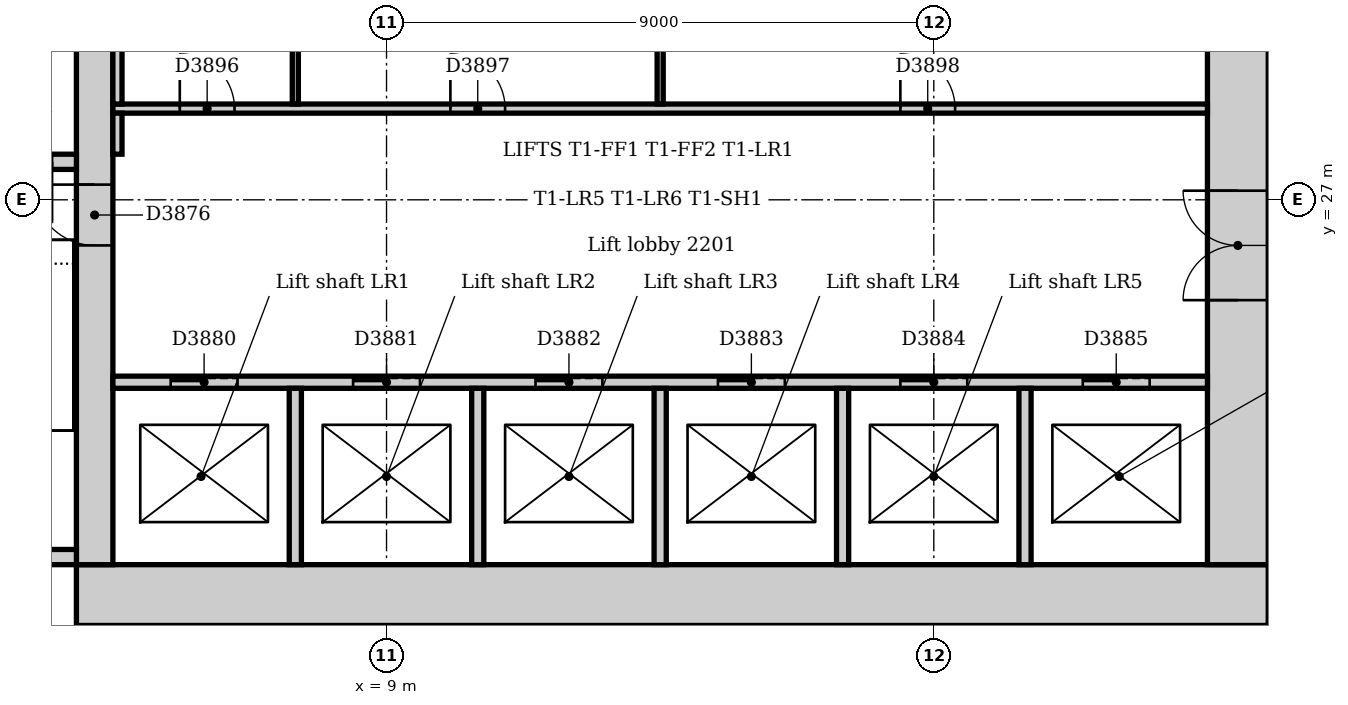
"""IFC4 building model, lengths in metres.
Left out: names, types, materials, properties, quantities, classifications, styles, units other than length and angle.
Written with IfcOpenShell. Run it as: python <this file> out.ifc"""

import sys

from ifc_helpers import new_model, si_unit, direction, frame, frame_2d, origin, place, context, subcontext, project, spatial, rectangle, extrude, element, fill, save


model = new_model("IFC4")
c1 = context("Model", 3, precision=1e-05, world=origin(), true_north=direction((0.0, 1.0)))
c2 = subcontext(c1, "Body", "Model", "MODEL_VIEW")
j1 = project(units=[si_unit("LENGTHUNIT", "METRE"), si_unit("PLANEANGLEUNIT", "RADIAN")], contexts=[c1])
p1 = place(None, origin())
s1 = spatial("IfcSite", under=j1, at=p1, CompositionType="ELEMENT")
p2 = place(p1, origin())
s2 = spatial("IfcBuilding", under=s1, at=p2, CompositionType="ELEMENT")
p3 = place(p2, frame((0.0, 0.0, 95.0)))
s3 = spatial("IfcBuildingStorey", under=s2, at=p3, CompositionType="ELEMENT", Elevation=95.0)
p4 = place(p3, frame((3.9, 20.5, 0.0), z_axis=(0.0, 0.0, 1.0), x_axis=(1.0, 0.0, 0.0)))
e1 = element("IfcWall", 1, at=p4, inside=s3, PredefinedType="SOLIDWALL", context=c2, shape_type="SweptSolid", body=[
    extrude(rectangle(XDim=19.6, YDim=1.0, at=frame_2d((9.8, 0.0))), origin(), (0.0, 0.0, 1.0), 5.0),
])
p5 = place(p3, frame((23.0, 21.0, 0.0), z_axis=(0.0, 0.0, 1.0), x_axis=(0.0, 1.0, 0.0)))
e2 = element("IfcWall", 2, at=p5, inside=s3, PredefinedType="SOLIDWALL", context=c2, shape_type="SweptSolid", body=[
    extrude(rectangle(XDim=10.5, YDim=1.0, at=frame_2d((5.25, 0.0))), origin(), (0.0, 0.0, 1.0), 5.0),
])
p6 = place(p5, frame((4.35, 0.0, 0.0)))
e3 = element("IfcOpeningElement", 3, at=p6, cuts=e2, PredefinedType="OPENING", context=c2, shape_type="SweptSolid", body=[
    extrude(rectangle(XDim=1.8, YDim=2.1, at=frame_2d((0.9, 1.05))), frame((0.0, 0.51, 0.0), z_axis=(0.0, -1.0, 0.0), x_axis=(1.0, 0.0, 0.0)), (0.0, 0.0, 1.0), 1.02),
])
p7 = place(p3, frame((4.2, 31.5, 0.0), z_axis=(0.0, 0.0, 1.0), x_axis=(0.0, -1.0, 0.0)))
e4 = element("IfcWall", 4, at=p7, inside=s3, PredefinedType="SOLIDWALL", context=c2, shape_type="SweptSolid", body=[
    extrude(rectangle(XDim=10.5, YDim=0.6, at=frame_2d((5.25, 0.0))), origin(), (0.0, 0.0, 1.0), 5.0),
])
p8 = place(p7, frame((4.25, 0.0, 0.0)))
e5 = element("IfcOpeningElement", 5, at=p8, cuts=e4, PredefinedType="OPENING", context=c2, shape_type="SweptSolid", body=[
    extrude(rectangle(XDim=1.0, YDim=2.1, at=frame_2d((0.5, 1.05))), frame((0.0, 0.31, 0.0), z_axis=(0.0, -1.0, 0.0), x_axis=(1.0, 0.0, 0.0)), (0.0, 0.0, 1.0), 0.62),
])
p9 = place(p3, frame((0.36, 21.125, 0.0), z_axis=(0.0, 0.0, 1.0), x_axis=(1.0, 0.0, 0.0)))
e6 = element("IfcWall", 6, at=p9, inside=s3, PredefinedType="SOLIDWALL", context=c2, shape_type="SweptSolid", body=[
    extrude(rectangle(XDim=3.54, YDim=0.25, at=frame_2d((1.77, 0.0))), origin(), (0.0, 0.0, 1.0), 5.0),
])
p10 = place(p3, frame((3.9, 27.625, 0.0), z_axis=(0.0, 0.0, 1.0), x_axis=(-1.0, 0.0, 0.0)))
e7 = element("IfcWall", 7, at=p10, inside=s3, PredefinedType="SOLIDWALL", context=c2, shape_type="SweptSolid", body=[
    extrude(rectangle(XDim=3.54, YDim=0.25, at=frame_2d((1.77, 0.0))), origin(), (0.0, 0.0, 1.0), 5.0),
])
p11 = place(p10, frame((0.4, 0.0, 0.0)))
e8 = element("IfcOpeningElement", 8, at=p11, cuts=e7, PredefinedType="OPENING", context=c2, shape_type="SweptSolid", body=[
    extrude(rectangle(XDim=1.0, YDim=2.1, at=frame_2d((0.5, 1.05))), frame((0.0, 0.135, 0.0), z_axis=(0.0, -1.0, 0.0), x_axis=(1.0, 0.0, 0.0)), (0.0, 0.0, 1.0), 0.27),
])
p12 = place(p3, frame((4.5, 24.0, 0.0), z_axis=(0.0, 0.0, 1.0), x_axis=(1.0, 0.0, 0.0)))
e9 = element("IfcWall", 9, at=p12, inside=s3, PredefinedType="PARTITIONING", context=c2, shape_type="SweptSolid", body=[
    extrude(rectangle(XDim=18.0, YDim=0.2, at=frame_2d((9.0, 0.0))), origin(), (0.0, 0.0, 1.0), 4.85),
])
p13 = place(p12, frame((0.95, 0.0, 0.0)))
e10 = element("IfcOpeningElement", 10, at=p13, cuts=e9, PredefinedType="OPENING", context=c2, shape_type="SweptSolid", body=[
    extrude(rectangle(XDim=1.1, YDim=2.1, at=frame_2d((0.55, 1.05))), frame((0.0, 0.11, 0.0), z_axis=(0.0, -1.0, 0.0), x_axis=(1.0, 0.0, 0.0)), (0.0, 0.0, 1.0), 0.22),
])
p14 = place(p12, frame((3.95, 0.0, 0.0)))
e11 = element("IfcOpeningElement", 11, at=p14, cuts=e9, PredefinedType="OPENING", context=c2, shape_type="SweptSolid", body=[
    extrude(rectangle(XDim=1.1, YDim=2.1, at=frame_2d((0.55, 1.05))), frame((0.0, 0.11, 0.0), z_axis=(0.0, -1.0, 0.0), x_axis=(1.0, 0.0, 0.0)), (0.0, 0.0, 1.0), 0.22),
])
p15 = place(p12, frame((6.95, 0.0, 0.0)))
e12 = element("IfcOpeningElement", 12, at=p15, cuts=e9, PredefinedType="OPENING", context=c2, shape_type="SweptSolid", body=[
    extrude(rectangle(XDim=1.1, YDim=2.1, at=frame_2d((0.55, 1.05))), frame((0.0, 0.11, 0.0), z_axis=(0.0, -1.0, 0.0), x_axis=(1.0, 0.0, 0.0)), (0.0, 0.0, 1.0), 0.22),
])
p16 = place(p12, frame((9.95, 0.0, 0.0)))
e13 = element("IfcOpeningElement", 13, at=p16, cuts=e9, PredefinedType="OPENING", context=c2, shape_type="SweptSolid", body=[
    extrude(rectangle(XDim=1.1, YDim=2.1, at=frame_2d((0.55, 1.05))), frame((0.0, 0.11, 0.0), z_axis=(0.0, -1.0, 0.0), x_axis=(1.0, 0.0, 0.0)), (0.0, 0.0, 1.0), 0.22),
])
p17 = place(p12, frame((12.95, 0.0, 0.0)))
e14 = element("IfcOpeningElement", 14, at=p17, cuts=e9, PredefinedType="OPENING", context=c2, shape_type="SweptSolid", body=[
    extrude(rectangle(XDim=1.1, YDim=2.1, at=frame_2d((0.55, 1.05))), frame((0.0, 0.11, 0.0), z_axis=(0.0, -1.0, 0.0), x_axis=(1.0, 0.0, 0.0)), (0.0, 0.0, 1.0), 0.22),
])
p18 = place(p12, frame((15.95, 0.0, 0.0)))
e15 = element("IfcOpeningElement", 15, at=p18, cuts=e9, PredefinedType="OPENING", context=c2, shape_type="SweptSolid", body=[
    extrude(rectangle(XDim=1.1, YDim=2.1, at=frame_2d((0.55, 1.05))), frame((0.0, 0.11, 0.0), z_axis=(0.0, -1.0, 0.0), x_axis=(1.0, 0.0, 0.0)), (0.0, 0.0, 1.0), 0.22),
])
for number, where, z_axis, x_axis in (
    (16, (7.5, 21.0, 0.0), (0.0, 0.0, 1.0), (0.0, 1.0, 0.0)),
    (17, (10.5, 21.0, 0.0), (0.0, 0.0, 1.0), (0.0, 1.0, 0.0)),
    (18, (13.5, 21.0, 0.0), (0.0, 0.0, 1.0), (0.0, 1.0, 0.0)),
    (19, (16.5, 21.0, 0.0), (0.0, 0.0, 1.0), (0.0, 1.0, 0.0)),
    (20, (19.5, 21.0, 0.0), (0.0, 0.0, 1.0), (0.0, 1.0, 0.0)),
):
    element("IfcWall", number, at=place(p3, frame(where, z_axis=z_axis, x_axis=x_axis)), inside=s3, PredefinedType="PARTITIONING", context=c2, shape_type="SweptSolid", body=[
        extrude(rectangle(XDim=2.9, YDim=0.2, at=frame_2d((1.45, 0.0))), origin(), (0.0, 0.0, 1.0), 4.85),
    ])
p19 = place(p3, frame((4.5, 28.5, 0.0), z_axis=(0.0, 0.0, 1.0), x_axis=(1.0, 0.0, 0.0)))
e21 = element("IfcWall", 21, at=p19, inside=s3, PredefinedType="PARTITIONING", context=c2, shape_type="SweptSolid", body=[
    extrude(rectangle(XDim=18.0, YDim=0.15, at=frame_2d((9.0, 0.0))), origin(), (0.0, 0.0, 1.0), 4.85),
])
p20 = place(p19, frame((1.1, 0.0, 0.0)))
e22 = element("IfcOpeningElement", 22, at=p20, cuts=e21, PredefinedType="OPENING", context=c2, shape_type="SweptSolid", body=[
    extrude(rectangle(XDim=0.9, YDim=2.1, at=frame_2d((0.45, 1.05))), frame((0.0, 0.085, 0.0), z_axis=(0.0, -1.0, 0.0), x_axis=(1.0, 0.0, 0.0)), (0.0, 0.0, 1.0), 0.17),
])
p21 = place(p19, frame((5.55, 0.0, 0.0)))
e23 = element("IfcOpeningElement", 23, at=p21, cuts=e21, PredefinedType="OPENING", context=c2, shape_type="SweptSolid", body=[
    extrude(rectangle(XDim=0.9, YDim=2.1, at=frame_2d((0.45, 1.05))), frame((0.0, 0.085, 0.0), z_axis=(0.0, -1.0, 0.0), x_axis=(1.0, 0.0, 0.0)), (0.0, 0.0, 1.0), 0.17),
])
p22 = place(p19, frame((12.95, 0.0, 0.0)))
e24 = element("IfcOpeningElement", 24, at=p22, cuts=e21, PredefinedType="OPENING", context=c2, shape_type="SweptSolid", body=[
    extrude(rectangle(XDim=0.9, YDim=2.1, at=frame_2d((0.45, 1.05))), frame((0.0, 0.085, 0.0), z_axis=(0.0, -1.0, 0.0), x_axis=(1.0, 0.0, 0.0)), (0.0, 0.0, 1.0), 0.17),
])
p23 = place(p3, frame((4.575, 27.75, 0.0), z_axis=(0.0, 0.0, 1.0), x_axis=(0.0, 1.0, 0.0)))
e25 = element("IfcWall", 25, at=p23, inside=s3, PredefinedType="PARTITIONING", context=c2, shape_type="SweptSolid", body=[
    extrude(rectangle(XDim=0.675, YDim=0.15, at=frame_2d((0.338, 0.0))), origin(), (0.0, 0.0, 1.0), 4.85),
])
p24 = place(p3, frame((4.575, 28.575, 0.0), z_axis=(0.0, 0.0, 1.0), x_axis=(0.0, 1.0, 0.0)))
e26 = element("IfcWall", 26, at=p24, inside=s3, PredefinedType="PARTITIONING", context=c2, shape_type="SweptSolid", body=[
    extrude(rectangle(XDim=2.675, YDim=0.15, at=frame_2d((1.337, 0.0))), origin(), (0.0, 0.0, 1.0), 4.85),
])
for number, where, z_axis, x_axis in (
    (27, (7.5, 28.575, 0.0), (0.0, 0.0, 1.0), (0.0, 1.0, 0.0)),
    (28, (13.5, 28.575, 0.0), (0.0, 0.0, 1.0), (0.0, 1.0, 0.0)),
):
    element("IfcWall", number, at=place(p3, frame(where, z_axis=z_axis, x_axis=x_axis)), inside=s3, PredefinedType="PARTITIONING", context=c2, shape_type="SweptSolid", body=[
        extrude(rectangle(XDim=2.675, YDim=0.1, at=frame_2d((1.337, 0.0))), origin(), (0.0, 0.0, 1.0), 4.85),
    ])
p25 = place(p8, frame((1.0, 0.0, 0.0), z_axis=(0.0, 0.0, 1.0), x_axis=(-1.0, 0.0, 0.0)))
e29 = element("IfcDoor", 29, at=p25, inside=s3, OperationType="SINGLE_SWING_RIGHT", PredefinedType="DOOR", context=c2, shape_type="SweptSolid", body=[
    extrude(rectangle(XDim=1.0, YDim=2.1, at=frame_2d((0.5, 1.05))), frame((0.0, 0.025, 0.0), z_axis=(0.0, -1.0, 0.0), x_axis=(1.0, 0.0, 0.0)), (0.0, 0.0, 1.0), 0.05),
])
fill(e5, e29)
p26 = place(p13, origin())
e30 = element("IfcDoor", 30, at=p26, inside=s3, OperationType="SLIDING_TO_LEFT", PredefinedType="DOOR", context=c2, shape_type="SweptSolid", body=[
    extrude(rectangle(XDim=1.1, YDim=2.1, at=frame_2d((0.55, 1.05))), frame((0.0, 0.025, 0.0), z_axis=(0.0, -1.0, 0.0), x_axis=(1.0, 0.0, 0.0)), (0.0, 0.0, 1.0), 0.05),
])
fill(e10, e30)
p27 = place(p14, origin())
e31 = element("IfcDoor", 31, at=p27, inside=s3, OperationType="SLIDING_TO_LEFT", PredefinedType="DOOR", context=c2, shape_type="SweptSolid", body=[
    extrude(rectangle(XDim=1.1, YDim=2.1, at=frame_2d((0.55, 1.05))), frame((0.0, 0.025, 0.0), z_axis=(0.0, -1.0, 0.0), x_axis=(1.0, 0.0, 0.0)), (0.0, 0.0, 1.0), 0.05),
])
fill(e11, e31)
p28 = place(p15, origin())
e32 = element("IfcDoor", 32, at=p28, inside=s3, OperationType="SLIDING_TO_LEFT", PredefinedType="DOOR", context=c2, shape_type="SweptSolid", body=[
    extrude(rectangle(XDim=1.1, YDim=2.1, at=frame_2d((0.55, 1.05))), frame((0.0, 0.025, 0.0), z_axis=(0.0, -1.0, 0.0), x_axis=(1.0, 0.0, 0.0)), (0.0, 0.0, 1.0), 0.05),
])
fill(e12, e32)
p29 = place(p16, origin())
e33 = element("IfcDoor", 33, at=p29, inside=s3, OperationType="SLIDING_TO_LEFT", PredefinedType="DOOR", context=c2, shape_type="SweptSolid", body=[
    extrude(rectangle(XDim=1.1, YDim=2.1, at=frame_2d((0.55, 1.05))), frame((0.0, 0.025, 0.0), z_axis=(0.0, -1.0, 0.0), x_axis=(1.0, 0.0, 0.0)), (0.0, 0.0, 1.0), 0.05),
])
fill(e13, e33)
p30 = place(p17, origin())
e34 = element("IfcDoor", 34, at=p30, inside=s3, OperationType="SLIDING_TO_LEFT", PredefinedType="DOOR", context=c2, shape_type="SweptSolid", body=[
    extrude(rectangle(XDim=1.1, YDim=2.1, at=frame_2d((0.55, 1.05))), frame((0.0, 0.025, 0.0), z_axis=(0.0, -1.0, 0.0), x_axis=(1.0, 0.0, 0.0)), (0.0, 0.0, 1.0), 0.05),
])
fill(e14, e34)
p31 = place(p18, origin())
e35 = element("IfcDoor", 35, at=p31, inside=s3, OperationType="SLIDING_TO_LEFT", PredefinedType="DOOR", context=c2, shape_type="SweptSolid", body=[
    extrude(rectangle(XDim=1.1, YDim=2.1, at=frame_2d((0.55, 1.05))), frame((0.0, 0.025, 0.0), z_axis=(0.0, -1.0, 0.0), x_axis=(1.0, 0.0, 0.0)), (0.0, 0.0, 1.0), 0.05),
])
fill(e15, e35)
p32 = place(p6, origin())
e36 = element("IfcDoor", 36, at=p32, inside=s3, OperationType="DOUBLE_DOOR_DOUBLE_SWING", PredefinedType="DOOR", context=c2, shape_type="SweptSolid", body=[
    extrude(rectangle(XDim=1.8, YDim=2.1, at=frame_2d((0.9, 1.05))), frame((0.0, 0.025, 0.0), z_axis=(0.0, -1.0, 0.0), x_axis=(1.0, 0.0, 0.0)), (0.0, 0.0, 1.0), 0.05),
])
fill(e3, e36)
p33 = place(p20, origin())
e37 = element("IfcDoor", 37, at=p33, inside=s3, OperationType="SINGLE_SWING_LEFT", PredefinedType="DOOR", context=c2, shape_type="SweptSolid", body=[
    extrude(rectangle(XDim=0.9, YDim=2.1, at=frame_2d((0.45, 1.05))), frame((0.0, 0.025, 0.0), z_axis=(0.0, -1.0, 0.0), x_axis=(1.0, 0.0, 0.0)), (0.0, 0.0, 1.0), 0.05),
])
fill(e22, e37)
p34 = place(p21, origin())
e38 = element("IfcDoor", 38, at=p34, inside=s3, OperationType="SINGLE_SWING_LEFT", PredefinedType="DOOR", context=c2, shape_type="SweptSolid", body=[
    extrude(rectangle(XDim=0.9, YDim=2.1, at=frame_2d((0.45, 1.05))), frame((0.0, 0.025, 0.0), z_axis=(0.0, -1.0, 0.0), x_axis=(1.0, 0.0, 0.0)), (0.0, 0.0, 1.0), 0.05),
])
fill(e23, e38)
p35 = place(p22, origin())
e39 = element("IfcDoor", 39, at=p35, inside=s3, OperationType="SINGLE_SWING_LEFT", PredefinedType="DOOR", context=c2, shape_type="SweptSolid", body=[
    extrude(rectangle(XDim=0.9, YDim=2.1, at=frame_2d((0.45, 1.05))), frame((0.0, 0.025, 0.0), z_axis=(0.0, -1.0, 0.0), x_axis=(1.0, 0.0, 0.0)), (0.0, 0.0, 1.0), 0.05),
])
fill(e24, e39)
save(model, sys.argv[1])
